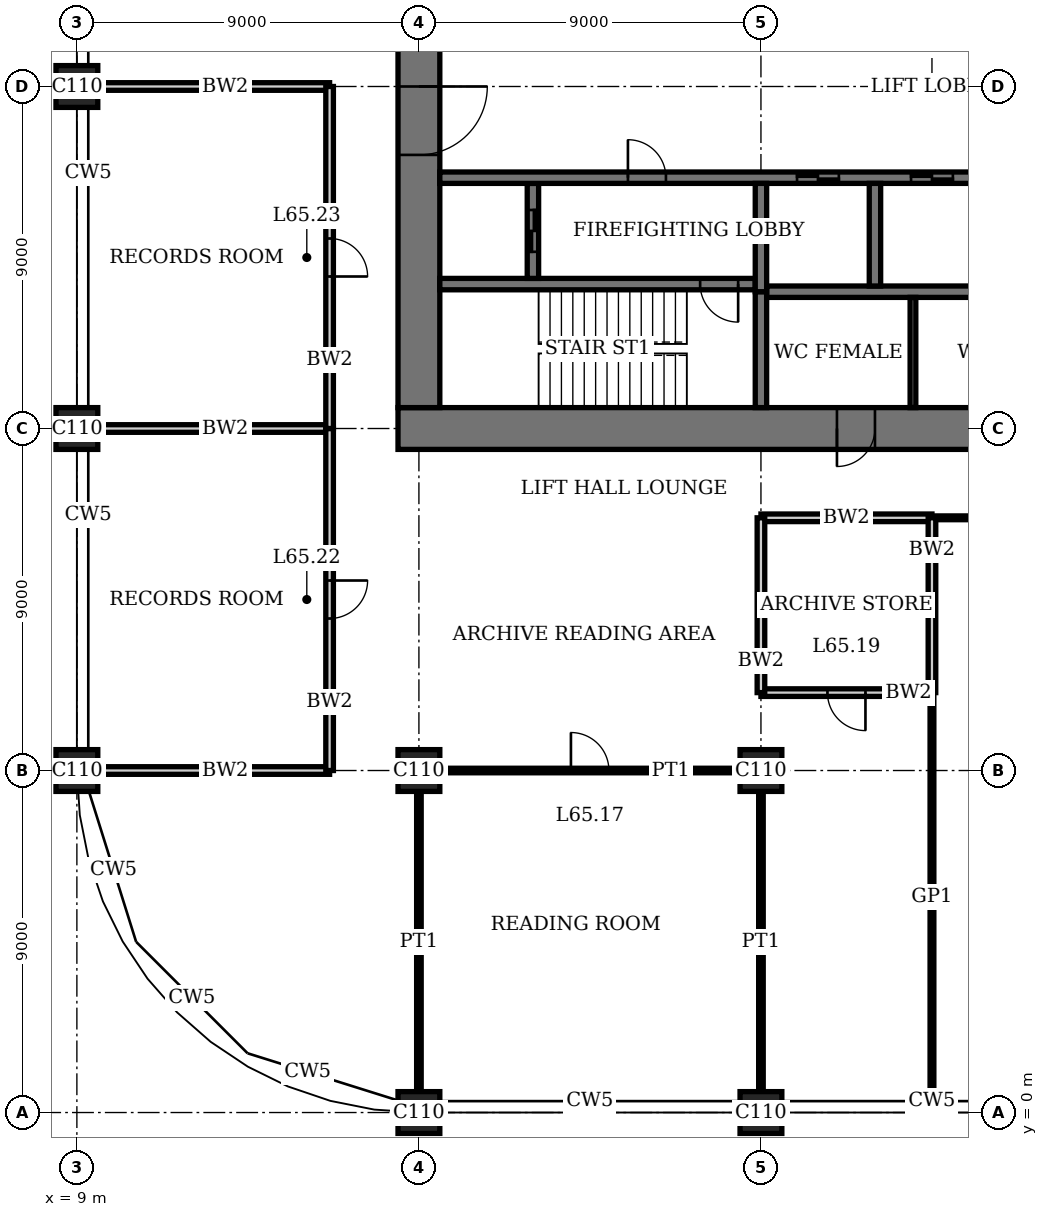
"""IFC4 building model, lengths in metres.
Left out: names, types, materials, properties, quantities, classifications, styles, units other than length and angle.
Written with IfcOpenShell. Run it as: python <this file> out.ifc"""

import sys

from ifc_helpers import new_model, si_unit, direction, frame, frame_2d, origin, origin_2d, place, context, subcontext, project, spatial, rectangle, extrude, element, fill, save


model = new_model("IFC4")
c1 = context("Model", 3, precision=1e-05, world=origin(), true_north=direction((0.0, 1.0)))
c2 = subcontext(c1, "Body", "Model", "MODEL_VIEW")
j1 = project(units=[si_unit("LENGTHUNIT", "METRE"), si_unit("PLANEANGLEUNIT", "RADIAN")], contexts=[c1])
p1 = place(None, origin())
s1 = spatial("IfcSite", under=j1, at=p1, CompositionType="ELEMENT")
p2 = place(p1, origin())
s2 = spatial("IfcBuilding", under=s1, at=p2, CompositionType="ELEMENT")
p3 = place(p2, frame((0.0, 0.0, 267.4)))
s3 = spatial("IfcBuildingStorey", under=s2, at=p3, CompositionType="ELEMENT", Elevation=267.4)
for number, where, z_axis, x_axis in (
    (1, (9.0, 9.0, 0.0), (0.0, 0.0, 1.0), (1.0, 0.0, 0.0)),
    (2, (9.0, 18.0, 0.0), (0.0, 0.0, 1.0), (1.0, 0.0, 0.0)),
    (3, (9.0, 27.0, 0.0), (0.0, 0.0, 1.0), (1.0, 0.0, 0.0)),
    (4, (18.0, 0.0, 0.0), (0.0, 0.0, 1.0), (1.0, 0.0, 0.0)),
    (5, (18.0, 9.0, 0.0), (0.0, 0.0, 1.0), (1.0, 0.0, 0.0)),
    (6, (27.0, 0.0, 0.0), (0.0, 0.0, 1.0), (1.0, 0.0, 0.0)),
    (7, (27.0, 9.0, 0.0), (0.0, 0.0, 1.0), (1.0, 0.0, 0.0)),
):
    element("IfcColumn", number, at=place(p3, frame(where, z_axis=z_axis, x_axis=x_axis)), inside=s3, PredefinedType="COLUMN", context=c2, shape_type="SweptSolid", body=[
        extrude(rectangle(XDim=1.1, YDim=1.1, at=origin_2d()), origin(), (0.0, 0.0, 1.0), 4.0),
    ])
p4 = place(p3, frame((17.45, 18.0, 0.0), z_axis=(0.0, 0.0, 1.0), x_axis=(1.0, 0.0, 0.0)))
e8 = element("IfcWall", 8, at=p4, inside=s3, PredefinedType="SHEAR", context=c2, shape_type="SweptSolid", body=[
    extrude(rectangle(XDim=28.1, YDim=1.1, at=frame_2d((14.05, 0.0))), origin(), (0.0, 0.0, 1.0), 4.0),
])
p5 = place(p4, frame((11.55, 0.0, 0.0)))
e9 = element("IfcOpeningElement", 9, at=p5, cuts=e8, PredefinedType="OPENING", context=c2, shape_type="SweptSolid", body=[
    extrude(rectangle(XDim=1.0, YDim=2.4, at=frame_2d((0.5, 1.2))), frame((0.0, 0.56, 0.0), z_axis=(0.0, -1.0, 0.0), x_axis=(1.0, 0.0, 0.0)), (0.0, 0.0, 1.0), 1.12),
])
p6 = place(p4, frame((16.55, 0.0, 0.0)))
e10 = element("IfcOpeningElement", 10, at=p6, cuts=e8, PredefinedType="OPENING", context=c2, shape_type="SweptSolid", body=[
    extrude(rectangle(XDim=1.0, YDim=2.4, at=frame_2d((0.5, 1.2))), frame((0.0, 0.56, 0.0), z_axis=(0.0, -1.0, 0.0), x_axis=(1.0, 0.0, 0.0)), (0.0, 0.0, 1.0), 1.12),
])
p7 = place(p4, frame((20.0, 0.0, 0.0)))
e11 = element("IfcOpeningElement", 11, at=p7, cuts=e8, PredefinedType="OPENING", context=c2, shape_type="SweptSolid", body=[
    extrude(rectangle(XDim=1.1, YDim=2.4, at=frame_2d((0.55, 1.2))), frame((0.0, 0.56, 0.0), z_axis=(0.0, -1.0, 0.0), x_axis=(1.0, 0.0, 0.0)), (0.0, 0.0, 1.0), 1.12),
])
p8 = place(p4, frame((24.05, 0.0, 0.0)))
e12 = element("IfcOpeningElement", 12, at=p8, cuts=e8, PredefinedType="OPENING", context=c2, shape_type="SweptSolid", body=[
    extrude(rectangle(XDim=1.0, YDim=2.4, at=frame_2d((0.5, 1.2))), frame((0.0, 0.56, 0.0), z_axis=(0.0, -1.0, 0.0), x_axis=(1.0, 0.0, 0.0)), (0.0, 0.0, 1.0), 1.12),
])
p9 = place(p3, frame((18.0, 35.45, 0.0), z_axis=(0.0, 0.0, 1.0), x_axis=(0.0, -1.0, 0.0)))
e13 = element("IfcWall", 13, at=p9, inside=s3, PredefinedType="SHEAR", context=c2, shape_type="SweptSolid", body=[
    extrude(rectangle(XDim=16.9, YDim=1.1, at=frame_2d((8.45, 0.0))), origin(), (0.0, 0.0, 1.0), 4.0),
])
p10 = place(p9, frame((8.45, 0.0, 0.0)))
e14 = element("IfcOpeningElement", 14, at=p10, cuts=e13, PredefinedType="OPENING", context=c2, shape_type="SweptSolid", body=[
    extrude(rectangle(XDim=1.8, YDim=2.4, at=frame_2d((0.9, 1.2))), frame((0.0, 0.56, 0.0), z_axis=(0.0, -1.0, 0.0), x_axis=(1.0, 0.0, 0.0)), (0.0, 0.0, 1.0), 1.12),
])
p11 = place(p3, frame((18.55, 21.8, 0.0), z_axis=(0.0, 0.0, 1.0), x_axis=(1.0, 0.0, 0.0)))
e15 = element("IfcWall", 15, at=p11, inside=s3, PredefinedType="SHEAR", context=c2, shape_type="SweptSolid", body=[
    extrude(rectangle(XDim=8.3, YDim=0.3, at=frame_2d((4.15, 0.0))), origin(), (0.0, 0.0, 1.0), 4.0),
])
p12 = place(p11, frame((6.85, 0.0, 0.0)))
e16 = element("IfcOpeningElement", 16, at=p12, cuts=e15, PredefinedType="OPENING", context=c2, shape_type="SweptSolid", body=[
    extrude(rectangle(XDim=1.0, YDim=2.4, at=frame_2d((0.5, 1.2))), frame((0.0, 0.16, 0.0), z_axis=(0.0, -1.0, 0.0), x_axis=(1.0, 0.0, 0.0)), (0.0, 0.0, 1.0), 0.32),
])
p13 = place(p3, frame((27.0, 18.55, 0.0), z_axis=(0.0, 0.0, 1.0), x_axis=(0.0, 1.0, 0.0)))
e17 = element("IfcWall", 17, at=p13, inside=s3, PredefinedType="SHEAR", context=c2, shape_type="SweptSolid", body=[
    extrude(rectangle(XDim=3.05, YDim=0.3, at=frame_2d((1.525, 0.0))), origin(), (0.0, 0.0, 1.0), 4.0),
])
p14 = place(p3, frame((21.0, 21.95, 0.0), z_axis=(0.0, 0.0, 1.0), x_axis=(0.0, 1.0, 0.0)))
e18 = element("IfcWall", 18, at=p14, inside=s3, PredefinedType="SHEAR", context=c2, shape_type="SweptSolid", body=[
    extrude(rectangle(XDim=2.5, YDim=0.3, at=frame_2d((1.25, 0.0))), origin(), (0.0, 0.0, 1.0), 4.0),
])
p15 = place(p14, frame((0.7, 0.0, 0.0)))
e19 = element("IfcOpeningElement", 19, at=p15, cuts=e18, PredefinedType="OPENING", context=c2, shape_type="SweptSolid", body=[
    extrude(rectangle(XDim=1.1, YDim=2.4, at=frame_2d((0.55, 1.2))), frame((0.0, 0.16, 0.0), z_axis=(0.0, -1.0, 0.0), x_axis=(1.0, 0.0, 0.0)), (0.0, 0.0, 1.0), 0.32),
])
p16 = place(p3, frame((18.55, 24.6, 0.0), z_axis=(0.0, 0.0, 1.0), x_axis=(1.0, 0.0, 0.0)))
e20 = element("IfcWall", 20, at=p16, inside=s3, PredefinedType="SHEAR", context=c2, shape_type="SweptSolid", body=[
    extrude(rectangle(XDim=25.9, YDim=0.3, at=frame_2d((12.95, 0.0))), origin(), (0.0, 0.0, 1.0), 4.0),
])
p17 = place(p16, frame((4.95, 0.0, 0.0)))
e21 = element("IfcOpeningElement", 21, at=p17, cuts=e20, PredefinedType="OPENING", context=c2, shape_type="SweptSolid", body=[
    extrude(rectangle(XDim=1.0, YDim=2.4, at=frame_2d((0.5, 1.2))), frame((0.0, 0.16, 0.0), z_axis=(0.0, -1.0, 0.0), x_axis=(1.0, 0.0, 0.0)), (0.0, 0.0, 1.0), 0.32),
])
p18 = place(p16, frame((24.5, 0.0, 0.0)))
e22 = element("IfcOpeningElement", 22, at=p18, cuts=e20, PredefinedType="OPENING", context=c2, shape_type="SweptSolid", body=[
    extrude(rectangle(XDim=0.9, YDim=2.1, at=frame_2d((0.45, 1.05))), frame((0.0, 0.16, 0.0), z_axis=(0.0, -1.0, 0.0), x_axis=(1.0, 0.0, 0.0)), (0.0, 0.0, 1.0), 0.32),
])
p19 = place(p16, frame((9.4, 0.0, 0.0)))
e23 = element("IfcOpeningElement", 23, at=p19, cuts=e20, PredefinedType="OPENING", context=c2, shape_type="SweptSolid", body=[
    extrude(rectangle(XDim=1.1, YDim=2.4, at=frame_2d((0.55, 1.2))), frame((0.0, 0.16, 0.0), z_axis=(0.0, -1.0, 0.0), x_axis=(1.0, 0.0, 0.0)), (0.0, 0.0, 1.0), 0.32),
])
p20 = place(p16, frame((12.4, 0.0, 0.0)))
e24 = element("IfcOpeningElement", 24, at=p20, cuts=e20, PredefinedType="OPENING", context=c2, shape_type="SweptSolid", body=[
    extrude(rectangle(XDim=1.1, YDim=2.4, at=frame_2d((0.55, 1.2))), frame((0.0, 0.16, 0.0), z_axis=(0.0, -1.0, 0.0), x_axis=(1.0, 0.0, 0.0)), (0.0, 0.0, 1.0), 0.32),
])
p21 = place(p16, frame((15.4, 0.0, 0.0)))
e25 = element("IfcOpeningElement", 25, at=p21, cuts=e20, PredefinedType="OPENING", context=c2, shape_type="SweptSolid", body=[
    extrude(rectangle(XDim=1.1, YDim=2.4, at=frame_2d((0.55, 1.2))), frame((0.0, 0.16, 0.0), z_axis=(0.0, -1.0, 0.0), x_axis=(1.0, 0.0, 0.0)), (0.0, 0.0, 1.0), 0.32),
])
p22 = place(p16, frame((18.4, 0.0, 0.0)))
e26 = element("IfcOpeningElement", 26, at=p22, cuts=e20, PredefinedType="OPENING", context=c2, shape_type="SweptSolid", body=[
    extrude(rectangle(XDim=1.1, YDim=2.4, at=frame_2d((0.55, 1.2))), frame((0.0, 0.16, 0.0), z_axis=(0.0, -1.0, 0.0), x_axis=(1.0, 0.0, 0.0)), (0.0, 0.0, 1.0), 0.32),
])
p23 = place(p16, frame((21.3, 0.0, 0.0)))
e27 = element("IfcOpeningElement", 27, at=p23, cuts=e20, PredefinedType="OPENING", context=c2, shape_type="SweptSolid", body=[
    extrude(rectangle(XDim=1.3, YDim=2.4, at=frame_2d((0.65, 1.2))), frame((0.0, 0.16, 0.0), z_axis=(0.0, -1.0, 0.0), x_axis=(1.0, 0.0, 0.0)), (0.0, 0.0, 1.0), 0.32),
])
p24 = place(p3, frame((27.15, 21.6, 0.0), z_axis=(0.0, 0.0, 1.0), x_axis=(1.0, 0.0, 0.0)))
e28 = element("IfcWall", 28, at=p24, inside=s3, PredefinedType="SHEAR", context=c2, shape_type="SweptSolid", body=[
    extrude(rectangle(XDim=17.3, YDim=0.3, at=frame_2d((8.65, 0.0))), origin(), (0.0, 0.0, 1.0), 4.0),
])
p25 = place(p3, frame((30.0, 21.75, 0.0), z_axis=(0.0, 0.0, 1.0), x_axis=(0.0, 1.0, 0.0)))
e29 = element("IfcWall", 29, at=p25, inside=s3, PredefinedType="SHEAR", context=c2, shape_type="SweptSolid", body=[
    extrude(rectangle(XDim=2.7, YDim=0.3, at=frame_2d((1.35, 0.0))), origin(), (0.0, 0.0, 1.0), 4.0),
])
p26 = place(p3, frame((27.0, 21.6, 0.0), z_axis=(0.0, 0.0, 1.0), x_axis=(0.0, 1.0, 0.0)))
e30 = element("IfcWall", 30, at=p26, inside=s3, PredefinedType="SHEAR", context=c2, shape_type="SweptSolid", body=[
    extrude(rectangle(XDim=2.85, YDim=0.3, at=frame_2d((1.425, 0.0))), origin(), (0.0, 0.0, 1.0), 4.0),
])
p27 = place(p3, frame((9.55, 9.0, 0.0), z_axis=(0.0, 0.0, 1.0), x_axis=(1.0, 0.0, 0.0)))
e31 = element("IfcWall", 31, at=p27, inside=s3, PredefinedType="SOLIDWALL", context=c2, shape_type="SweptSolid", body=[
    extrude(rectangle(XDim=6.1, YDim=0.2, at=frame_2d((3.05, 0.0))), origin(), (0.0, 0.0, 1.0), 3.05),
])
p28 = place(p3, frame((18.55, 9.0, 0.0), z_axis=(0.0, 0.0, 1.0), x_axis=(1.0, 0.0, 0.0)))
e32 = element("IfcWall", 32, at=p28, inside=s3, PredefinedType="PARTITIONING", context=c2, shape_type="SweptSolid", body=[
    extrude(rectangle(XDim=7.9, YDim=0.12, at=frame_2d((3.95, 0.0))), origin(), (0.0, 0.0, 1.0), 3.05),
])
p29 = place(p28, frame((3.45, 0.0, 0.0)))
e33 = element("IfcOpeningElement", 33, at=p29, cuts=e32, PredefinedType="OPENING", context=c2, shape_type="SweptSolid", body=[
    extrude(rectangle(XDim=1.0, YDim=2.4, at=frame_2d((0.5, 1.2))), frame((0.0, 0.07, 0.0), z_axis=(0.0, -1.0, 0.0), x_axis=(1.0, 0.0, 0.0)), (0.0, 0.0, 1.0), 0.14),
])
p30 = place(p3, frame((27.0, 11.05, 0.0), z_axis=(0.0, 0.0, 1.0), x_axis=(1.0, 0.0, 0.0)))
e34 = element("IfcWall", 34, at=p30, inside=s3, PredefinedType="SOLIDWALL", context=c2, shape_type="SweptSolid", body=[
    extrude(rectangle(XDim=4.5, YDim=0.2, at=frame_2d((2.25, 0.0))), origin(), (0.0, 0.0, 1.0), 3.75),
])
p31 = place(p30, frame((1.75, 0.0, 0.0)))
e35 = element("IfcOpeningElement", 35, at=p31, cuts=e34, PredefinedType="OPENING", context=c2, shape_type="SweptSolid", body=[
    extrude(rectangle(XDim=1.0, YDim=2.4, at=frame_2d((0.5, 1.2))), frame((0.0, 0.11, 0.0), z_axis=(0.0, -1.0, 0.0), x_axis=(1.0, 0.0, 0.0)), (0.0, 0.0, 1.0), 0.22),
])
p32 = place(p3, frame((27.0, 15.65, 0.0), z_axis=(0.0, 0.0, 1.0), x_axis=(1.0, 0.0, 0.0)))
e36 = element("IfcWall", 36, at=p32, inside=s3, PredefinedType="SOLIDWALL", context=c2, shape_type="SweptSolid", body=[
    extrude(rectangle(XDim=4.5, YDim=0.2, at=frame_2d((2.25, 0.0))), origin(), (0.0, 0.0, 1.0), 3.75),
])
p33 = place(p3, frame((31.55, 15.65, 0.0), z_axis=(0.0, 0.0, 1.0), x_axis=(1.0, 0.0, 0.0)))
e37 = element("IfcWall", 37, at=p33, inside=s3, PredefinedType="PARTITIONING", context=c2, shape_type="SweptSolid", body=[
    extrude(rectangle(XDim=15.79, YDim=0.1, at=frame_2d((7.895, 0.0))), origin(), (0.0, 0.0, 1.0), 3.75),
])
p34 = place(p33, frame((7.395, 0.0, 0.0)))
e38 = element("IfcOpeningElement", 38, at=p34, cuts=e37, PredefinedType="OPENING", context=c2, shape_type="SweptSolid", body=[
    extrude(rectangle(XDim=1.0, YDim=2.4, at=frame_2d((0.5, 1.2))), frame((0.0, 0.06, 0.0), z_axis=(0.0, -1.0, 0.0), x_axis=(1.0, 0.0, 0.0)), (0.0, 0.0, 1.0), 0.12),
])
for number, where, z_axis, x_axis in (
    (39, (9.55, 18.0, 0.0), (0.0, 0.0, 1.0), (1.0, 0.0, 0.0)),
    (40, (9.55, 27.0, 0.0), (0.0, 0.0, 1.0), (1.0, 0.0, 0.0)),
):
    element("IfcWall", number, at=place(p3, frame(where, z_axis=z_axis, x_axis=x_axis)), inside=s3, PredefinedType="SOLIDWALL", context=c2, shape_type="SweptSolid", body=[
        extrude(rectangle(XDim=6.1, YDim=0.2, at=frame_2d((3.05, 0.0))), origin(), (0.0, 0.0, 1.0), 3.05),
    ])
p35 = place(p3, frame((15.65, 9.0, 0.0), z_axis=(0.0, 0.0, 1.0), x_axis=(0.0, 1.0, 0.0)))
e41 = element("IfcWall", 41, at=p35, inside=s3, PredefinedType="SOLIDWALL", context=c2, shape_type="SweptSolid", body=[
    extrude(rectangle(XDim=9.0, YDim=0.2, at=frame_2d((4.5, 0.0))), origin(), (0.0, 0.0, 1.0), 3.75),
])
p36 = place(p35, frame((4.0, 0.0, 0.0)))
e42 = element("IfcOpeningElement", 42, at=p36, cuts=e41, PredefinedType="OPENING", context=c2, shape_type="SweptSolid", body=[
    extrude(rectangle(XDim=1.0, YDim=2.4, at=frame_2d((0.5, 1.2))), frame((0.0, 0.11, 0.0), z_axis=(0.0, -1.0, 0.0), x_axis=(1.0, 0.0, 0.0)), (0.0, 0.0, 1.0), 0.22),
])
p37 = place(p3, frame((15.65, 18.0, 0.0), z_axis=(0.0, 0.0, 1.0), x_axis=(0.0, 1.0, 0.0)))
e43 = element("IfcWall", 43, at=p37, inside=s3, PredefinedType="SOLIDWALL", context=c2, shape_type="SweptSolid", body=[
    extrude(rectangle(XDim=9.0, YDim=0.2, at=frame_2d((4.5, 0.0))), origin(), (0.0, 0.0, 1.0), 3.75),
])
p38 = place(p37, frame((4.0, 0.0, 0.0)))
e44 = element("IfcOpeningElement", 44, at=p38, cuts=e43, PredefinedType="OPENING", context=c2, shape_type="SweptSolid", body=[
    extrude(rectangle(XDim=1.0, YDim=2.4, at=frame_2d((0.5, 1.2))), frame((0.0, 0.11, 0.0), z_axis=(0.0, -1.0, 0.0), x_axis=(1.0, 0.0, 0.0)), (0.0, 0.0, 1.0), 0.22),
])
p39 = place(p3, frame((18.0, 0.55, 0.0), z_axis=(0.0, 0.0, 1.0), x_axis=(0.0, 1.0, 0.0)))
e45 = element("IfcWall", 45, at=p39, inside=s3, PredefinedType="PARTITIONING", context=c2, shape_type="SweptSolid", body=[
    extrude(rectangle(XDim=7.9, YDim=0.12, at=frame_2d((3.95, 0.0))), origin(), (0.0, 0.0, 1.0), 3.05),
])
p40 = place(p3, frame((27.0, 11.05, 0.0), z_axis=(0.0, 0.0, 1.0), x_axis=(0.0, 1.0, 0.0)))
e46 = element("IfcWall", 46, at=p40, inside=s3, PredefinedType="SOLIDWALL", context=c2, shape_type="SweptSolid", body=[
    extrude(rectangle(XDim=4.6, YDim=0.2, at=frame_2d((2.3, 0.0))), origin(), (0.0, 0.0, 1.0), 3.05),
])
p41 = place(p3, frame((27.0, 0.55, 0.0), z_axis=(0.0, 0.0, 1.0), x_axis=(0.0, 1.0, 0.0)))
e47 = element("IfcWall", 47, at=p41, inside=s3, PredefinedType="PARTITIONING", context=c2, shape_type="SweptSolid", body=[
    extrude(rectangle(XDim=7.9, YDim=0.12, at=frame_2d((3.95, 0.0))), origin(), (0.0, 0.0, 1.0), 3.05),
])
p42 = place(p3, frame((31.5, 11.05, 0.0), z_axis=(0.0, 0.0, 1.0), x_axis=(0.0, 1.0, 0.0)))
e48 = element("IfcWall", 48, at=p42, inside=s3, PredefinedType="SOLIDWALL", context=c2, shape_type="SweptSolid", body=[
    extrude(rectangle(XDim=4.6, YDim=0.2, at=frame_2d((2.3, 0.0))), origin(), (0.0, 0.0, 1.0), 3.75),
])
p43 = place(p3, frame((31.5, 0.31, 0.0), z_axis=(0.0, 0.0, 1.0), x_axis=(0.0, 1.0, 0.0)))
e49 = element("IfcWall", 49, at=p43, inside=s3, PredefinedType="PARTITIONING", context=c2, shape_type="SweptSolid", body=[
    extrude(rectangle(XDim=10.74, YDim=0.1, at=frame_2d((5.37, 0.0))), origin(), (0.0, 0.0, 1.0), 3.75),
])
p44 = place(p3, frame((31.0, 18.55, 0.0), z_axis=(0.0, 0.0, 1.0), x_axis=(0.0, 1.0, 0.0)))
e50 = element("IfcWall", 50, at=p44, inside=s3, PredefinedType="PARTITIONING", context=c2, shape_type="SweptSolid", body=[
    extrude(rectangle(XDim=2.9, YDim=0.15, at=frame_2d((1.45, 0.0))), origin(), (0.0, 0.0, 1.0), 3.75),
])
p45 = place(p10, origin())
e51 = element("IfcDoor", 51, at=p45, inside=s3, OperationType="DOUBLE_DOOR_DOUBLE_SWING", PredefinedType="DOOR", context=c2, shape_type="SweptSolid", body=[
    extrude(rectangle(XDim=1.8, YDim=2.4, at=frame_2d((0.9, 1.2))), frame((0.0, 0.03, 0.0), z_axis=(0.0, -1.0, 0.0), x_axis=(1.0, 0.0, 0.0)), (0.0, 0.0, 1.0), 0.06),
    extrude(rectangle(XDim=0.04, YDim=2.4, at=frame_2d((0.02, 1.2))), frame((0.0, 0.55, 0.0), z_axis=(0.0, -1.0, 0.0), x_axis=(1.0, 0.0, 0.0)), (0.0, 0.0, 1.0), 1.1),
    extrude(rectangle(XDim=0.04, YDim=2.4, at=frame_2d((1.78, 1.2))), frame((0.0, 0.55, 0.0), z_axis=(0.0, -1.0, 0.0), x_axis=(1.0, 0.0, 0.0)), (0.0, 0.0, 1.0), 1.1),
    extrude(rectangle(XDim=1.8, YDim=0.04, at=frame_2d((0.9, 2.38))), frame((0.0, 0.55, 0.0), z_axis=(0.0, -1.0, 0.0), x_axis=(1.0, 0.0, 0.0)), (0.0, 0.0, 1.0), 1.1),
])
fill(e14, e51)
p46 = place(p5, origin())
e52 = element("IfcDoor", 52, at=p46, inside=s3, OperationType="SINGLE_SWING_LEFT", PredefinedType="DOOR", context=c2, shape_type="SweptSolid", body=[
    extrude(rectangle(XDim=1.0, YDim=2.4, at=frame_2d((0.5, 1.2))), frame((0.0, 0.025, 0.0), z_axis=(0.0, -1.0, 0.0), x_axis=(1.0, 0.0, 0.0)), (0.0, 0.0, 1.0), 0.05),
    extrude(rectangle(XDim=0.04, YDim=2.4, at=frame_2d((0.02, 1.2))), frame((0.0, 0.4, 0.0), z_axis=(0.0, -1.0, 0.0), x_axis=(1.0, 0.0, 0.0)), (0.0, 0.0, 1.0), 0.8),
    extrude(rectangle(XDim=0.04, YDim=2.4, at=frame_2d((0.98, 1.2))), frame((0.0, 0.4, 0.0), z_axis=(0.0, -1.0, 0.0), x_axis=(1.0, 0.0, 0.0)), (0.0, 0.0, 1.0), 0.8),
    extrude(rectangle(XDim=1.0, YDim=0.04, at=frame_2d((0.5, 2.38))), frame((0.0, 0.4, 0.0), z_axis=(0.0, -1.0, 0.0), x_axis=(1.0, 0.0, 0.0)), (0.0, 0.0, 1.0), 0.8),
])
fill(e9, e52)
p47 = place(p12, origin())
e53 = element("IfcDoor", 53, at=p47, inside=s3, OperationType="SINGLE_SWING_RIGHT", PredefinedType="DOOR", context=c2, shape_type="SweptSolid", body=[
    extrude(rectangle(XDim=1.0, YDim=2.4, at=frame_2d((0.5, 1.2))), frame((0.0, 0.03, 0.0), z_axis=(0.0, -1.0, 0.0), x_axis=(1.0, 0.0, 0.0)), (0.0, 0.0, 1.0), 0.06),
])
fill(e16, e53)
p48 = place(p17, origin())
e54 = element("IfcDoor", 54, at=p48, inside=s3, OperationType="SINGLE_SWING_RIGHT", PredefinedType="DOOR", context=c2, shape_type="SweptSolid", body=[
    extrude(rectangle(XDim=1.0, YDim=2.4, at=frame_2d((0.5, 1.2))), frame((0.0, 0.03, 0.0), z_axis=(0.0, -1.0, 0.0), x_axis=(1.0, 0.0, 0.0)), (0.0, 0.0, 1.0), 0.06),
])
fill(e21, e54)
p49 = place(p29, origin())
e55 = element("IfcDoor", 55, at=p49, inside=s3, OperationType="SINGLE_SWING_RIGHT", PredefinedType="DOOR", context=c2, shape_type="SweptSolid", body=[
    extrude(rectangle(XDim=1.0, YDim=2.4, at=frame_2d((0.5, 1.2))), frame((0.0, 0.025, 0.0), z_axis=(0.0, -1.0, 0.0), x_axis=(1.0, 0.0, 0.0)), (0.0, 0.0, 1.0), 0.05),
])
fill(e33, e55)
p50 = place(p31, origin())
e56 = element("IfcDoor", 56, at=p50, inside=s3, OperationType="SINGLE_SWING_RIGHT", PredefinedType="DOOR", context=c2, shape_type="SweptSolid", body=[
    extrude(rectangle(XDim=1.0, YDim=2.4, at=frame_2d((0.5, 1.2))), frame((0.0, 0.035, 0.0), z_axis=(0.0, -1.0, 0.0), x_axis=(1.0, 0.0, 0.0)), (0.0, 0.0, 1.0), 0.07),
])
fill(e35, e56)
p51 = place(p36, origin())
e57 = element("IfcDoor", 57, at=p51, inside=s3, OperationType="SINGLE_SWING_RIGHT", PredefinedType="DOOR", context=c2, shape_type="SweptSolid", body=[
    extrude(rectangle(XDim=1.0, YDim=2.4, at=frame_2d((0.5, 1.2))), frame((0.0, 0.035, 0.0), z_axis=(0.0, -1.0, 0.0), x_axis=(1.0, 0.0, 0.0)), (0.0, 0.0, 1.0), 0.07),
])
fill(e42, e57)
p52 = place(p38, origin())
e58 = element("IfcDoor", 58, at=p52, inside=s3, OperationType="SINGLE_SWING_LEFT", PredefinedType="DOOR", context=c2, shape_type="SweptSolid", body=[
    extrude(rectangle(XDim=1.0, YDim=2.4, at=frame_2d((0.5, 1.2))), frame((0.0, 0.035, 0.0), z_axis=(0.0, -1.0, 0.0), x_axis=(1.0, 0.0, 0.0)), (0.0, 0.0, 1.0), 0.07),
])
fill(e44, e58)
p53 = place(p19, origin())
e59 = element("IfcDoor", 59, at=p53, inside=s3, OperationType="DOUBLE_DOOR_SLIDING", PredefinedType="DOOR", context=c2, shape_type="SweptSolid", body=[
    extrude(rectangle(XDim=1.1, YDim=2.4, at=frame_2d((0.55, 1.2))), frame((0.0, 0.02, 0.0), z_axis=(0.0, -1.0, 0.0), x_axis=(1.0, 0.0, 0.0)), (0.0, 0.0, 1.0), 0.04),
])
fill(e23, e59)
p54 = place(p20, origin())
e60 = element("IfcDoor", 60, at=p54, inside=s3, OperationType="DOUBLE_DOOR_SLIDING", PredefinedType="DOOR", context=c2, shape_type="SweptSolid", body=[
    extrude(rectangle(XDim=1.1, YDim=2.4, at=frame_2d((0.55, 1.2))), frame((0.0, 0.02, 0.0), z_axis=(0.0, -1.0, 0.0), x_axis=(1.0, 0.0, 0.0)), (0.0, 0.0, 1.0), 0.04),
])
fill(e24, e60)
p55 = place(p15, origin())
e61 = element("IfcDoor", 61, at=p55, inside=s3, OperationType="DOUBLE_DOOR_SLIDING", PredefinedType="DOOR", context=c2, shape_type="SweptSolid", body=[
    extrude(rectangle(XDim=1.1, YDim=2.4, at=frame_2d((0.55, 1.2))), frame((0.0, 0.03, 0.0), z_axis=(0.0, -1.0, 0.0), x_axis=(1.0, 0.0, 0.0)), (0.0, 0.0, 1.0), 0.06),
])
fill(e19, e61)
save(model, sys.argv[1])
